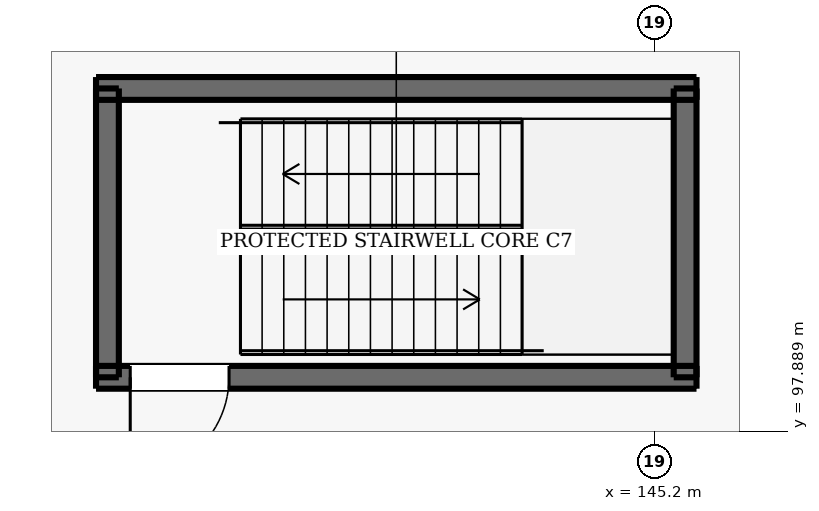
"""IFC4 building model, lengths in metres.
Left out: names, types, materials, properties, quantities, classifications, styles, units other than length and angle.
Written with IfcOpenShell. Run it as: python <this file> out.ifc"""

import sys

from ifc_helpers import new_model, si_unit, direction, frame, frame_2d, origin, place, context, subcontext, project, spatial, rectangle, extrude, element, fill, save


model = new_model("IFC4")
c1 = context("Model", 3, precision=1e-05, world=origin(), true_north=direction((0.0, 1.0)))
c2 = subcontext(c1, "Body", "Model", "MODEL_VIEW")
j1 = project(units=[si_unit("LENGTHUNIT", "METRE"), si_unit("PLANEANGLEUNIT", "RADIAN")], contexts=[c1])
p1 = place(None, origin())
s1 = spatial("IfcSite", under=j1, at=p1, CompositionType="ELEMENT")
p2 = place(p1, origin())
s2 = spatial("IfcBuilding", under=s1, at=p2, CompositionType="ELEMENT")
p3 = place(p2, frame((0.0, 0.0, -4.8)))
s3 = spatial("IfcBuildingStorey", under=s2, at=p3, CompositionType="ELEMENT", Elevation=-4.8)
p4 = place(p3, frame((137.85, 98.6, 0.0), z_axis=(0.0, 0.0, 1.0), x_axis=(1.0, 0.0, 0.0)))
e1 = element("IfcWall", 1, at=p4, inside=s3, PredefinedType="SHEAR", context=c2, shape_type="SweptSolid", body=[
    extrude(rectangle(XDim=7.9, YDim=0.3, at=frame_2d((3.95, 0.0))), origin(), (0.0, 0.0, 1.0), 4.8),
])
p5 = place(p4, frame((0.45, 0.0, 0.0)))
e2 = element("IfcOpeningElement", 2, at=p5, cuts=e1, PredefinedType="OPENING", context=c2, shape_type="SweptSolid", body=[
    extrude(rectangle(XDim=1.3, YDim=2.15, at=frame_2d((0.65, 1.075))), frame((0.0, 0.16, 0.0), z_axis=(0.0, -1.0, 0.0), x_axis=(1.0, 0.0, 0.0)), (0.0, 0.0, 1.0), 0.32),
])
p6 = place(p3, frame((137.85, 102.4, 0.0), z_axis=(0.0, 0.0, 1.0), x_axis=(1.0, 0.0, 0.0)))
e3 = element("IfcWall", 3, at=p6, inside=s3, PredefinedType="SHEAR", context=c2, shape_type="SweptSolid", body=[
    extrude(rectangle(XDim=7.9, YDim=0.3, at=frame_2d((3.95, 0.0))), origin(), (0.0, 0.0, 1.0), 4.8),
])
for number, where, z_axis, x_axis in (
    (4, (138.0, 98.6, 0.0), (0.0, 0.0, 1.0), (0.0, 1.0, 0.0)),
    (5, (145.6, 98.6, 0.0), (0.0, 0.0, 1.0), (0.0, 1.0, 0.0)),
):
    element("IfcWall", number, at=place(p3, frame(where, z_axis=z_axis, x_axis=x_axis)), inside=s3, PredefinedType="SHEAR", context=c2, shape_type="SweptSolid", body=[
        extrude(rectangle(XDim=3.8, YDim=0.3, at=frame_2d((1.9, 0.0))), origin(), (0.0, 0.0, 1.0), 4.8),
    ])
p7 = place(p5, frame((1.3, 0.0, 0.0), z_axis=(0.0, 0.0, 1.0), x_axis=(-1.0, 0.0, 0.0)))
e6 = element("IfcDoor", 6, at=p7, inside=s3, OperationType="SINGLE_SWING_LEFT", PredefinedType="DOOR", context=c2, shape_type="SweptSolid", body=[
    extrude(rectangle(XDim=1.3, YDim=2.15, at=frame_2d((0.65, 1.075))), frame((0.0, 0.025, 0.0), z_axis=(0.0, -1.0, 0.0), x_axis=(1.0, 0.0, 0.0)), (0.0, 0.0, 1.0), 0.05),
])
fill(e2, e6)
save(model, sys.argv[1])
